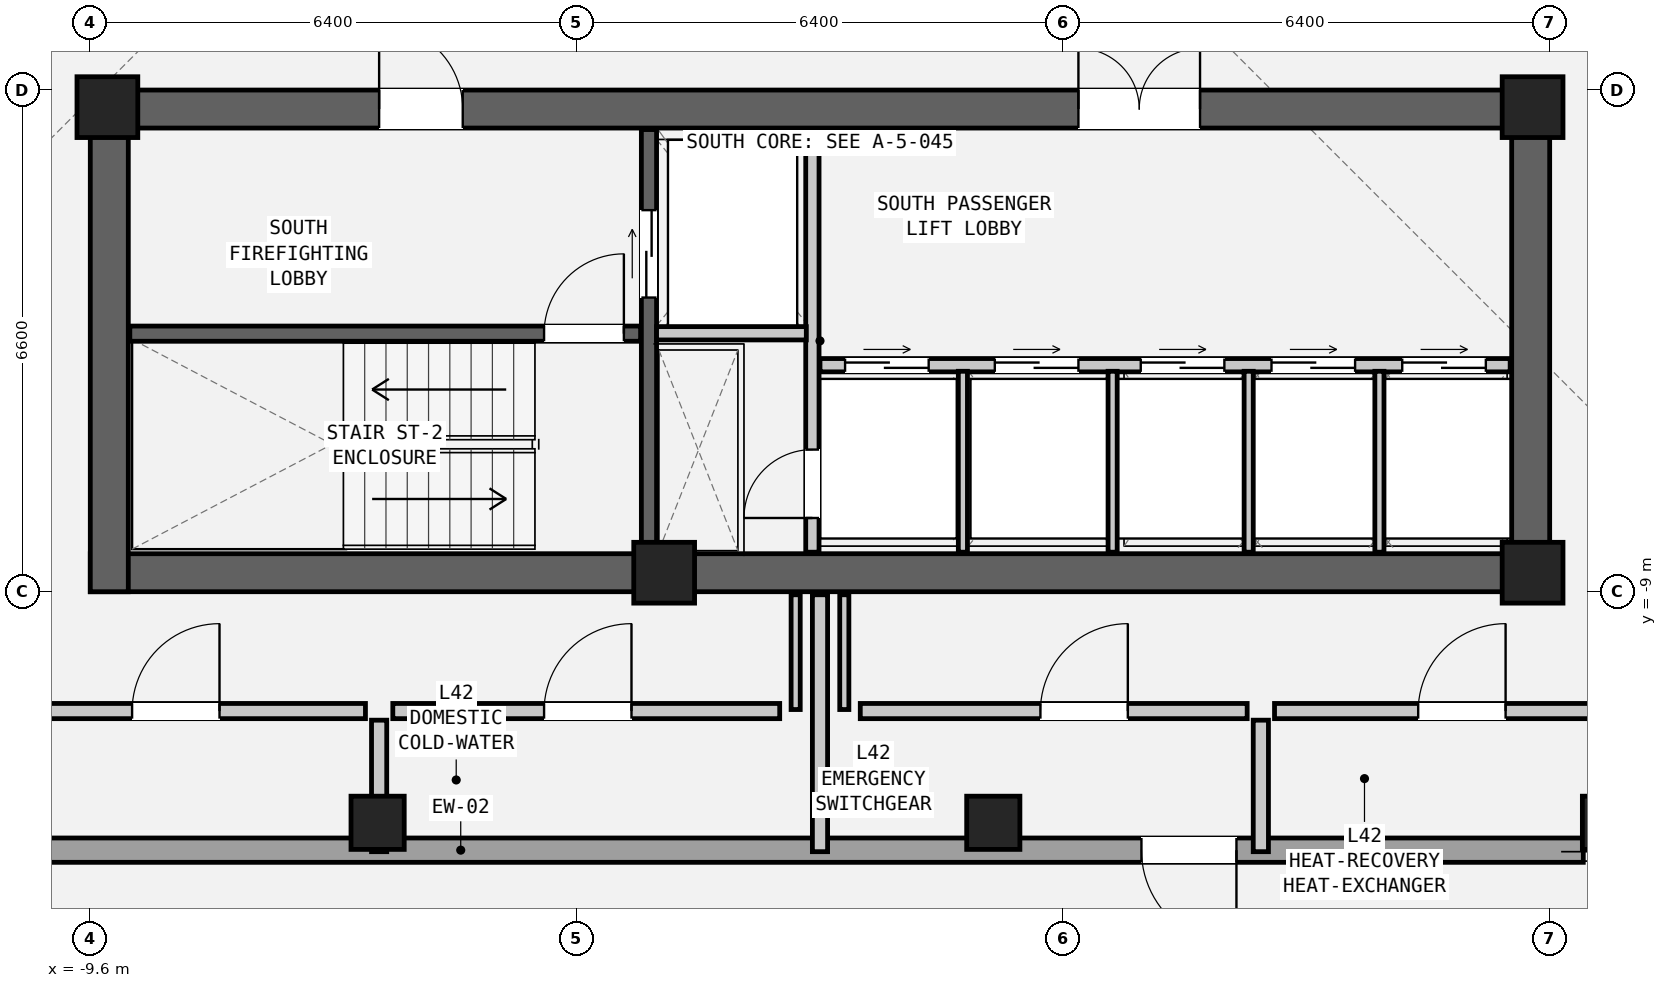
"""IFC4 building model, lengths in metres.
Left out: names, types, materials, properties, quantities, classifications, styles, units other than length and angle.
Written with IfcOpenShell. Run it as: python <this file> out.ifc"""

import sys

from ifc_helpers import new_model, si_unit, direction, frame, frame_2d, origin, origin_2d, place, context, subcontext, project, spatial, rectangle, hollow_rectangle, extrude, element, fill, save


model = new_model("IFC4")
c1 = context("Model", 3, precision=1e-05, world=origin(), true_north=direction((0.0, 1.0)))
c2 = subcontext(c1, "Body", "Model", "MODEL_VIEW")
j1 = project(units=[si_unit("LENGTHUNIT", "METRE"), si_unit("PLANEANGLEUNIT", "RADIAN")], contexts=[c1])
p1 = place(None, origin())
s1 = spatial("IfcSite", under=j1, at=p1, CompositionType="ELEMENT")
p2 = place(p1, origin())
s2 = spatial("IfcBuilding", under=s1, at=p2, CompositionType="ELEMENT")
p3 = place(p2, frame((0.0, 0.0, 144.6)))
s3 = spatial("IfcBuildingStorey", under=s2, at=p3, CompositionType="ELEMENT", Elevation=144.6)
p4 = place(p3, frame((-9.6, -8.75, 0.0), z_axis=(0.0, 0.0, 1.0), x_axis=(1.0, 0.0, 0.0)))
e1 = element("IfcWall", 1, at=p4, inside=s3, PredefinedType="SHEAR", context=c2, shape_type="SweptSolid", body=[
    extrude(rectangle(XDim=19.2, YDim=0.5, at=frame_2d((9.6, 0.0))), origin(), (0.0, 0.0, 1.0), 3.6),
])
p5 = place(p3, frame((-9.6, -2.65, 0.0), z_axis=(0.0, 0.0, 1.0), x_axis=(1.0, 0.0, 0.0)))
e2 = element("IfcWall", 2, at=p5, inside=s3, PredefinedType="SHEAR", context=c2, shape_type="SweptSolid", body=[
    extrude(rectangle(XDim=19.2, YDim=0.5, at=frame_2d((9.6, 0.0))), origin(), (0.0, 0.0, 1.0), 3.6),
])
p6 = place(p5, frame((3.8, 0.0, 0.0)))
e3 = element("IfcOpeningElement", 3, at=p6, cuts=e2, PredefinedType="OPENING", context=c2, shape_type="SweptSolid", body=[
    extrude(rectangle(XDim=1.1, YDim=2.08, at=frame_2d((0.55, 1.04))), frame((0.0, 0.262, 0.0), z_axis=(0.0, -1.0, 0.0), x_axis=(1.0, 0.0, 0.0)), (0.0, 0.0, 1.0), 0.524),
])
p7 = place(p5, frame((13.0, 0.0, 0.0)))
e4 = element("IfcOpeningElement", 4, at=p7, cuts=e2, PredefinedType="OPENING", context=c2, shape_type="SweptSolid", body=[
    extrude(rectangle(XDim=1.6, YDim=2.12, at=frame_2d((0.8, 1.06))), frame((0.0, 0.262, 0.0), z_axis=(0.0, -1.0, 0.0), x_axis=(1.0, 0.0, 0.0)), (0.0, 0.0, 1.0), 0.524),
])
for number, where, z_axis, x_axis in (
    (5, (-9.35, -9.0, 0.0), (0.0, 0.0, 1.0), (0.0, 1.0, 0.0)),
    (6, (9.35, -9.0, 0.0), (0.0, 0.0, 1.0), (0.0, 1.0, 0.0)),
):
    element("IfcWall", number, at=place(p3, frame(where, z_axis=z_axis, x_axis=x_axis)), inside=s3, PredefinedType="SHEAR", context=c2, shape_type="SweptSolid", body=[
        extrude(rectangle(XDim=6.6, YDim=0.5, at=frame_2d((3.3, 0.0))), origin(), (0.0, 0.0, 1.0), 3.6),
    ])
for number, where, z_axis, x_axis in (
    (7, (-5.82, -12.04, 0.0), (0.0, 0.0, 1.0), (1.0, 0.0, 0.0)),
    (8, (2.28, -12.04, 0.0), (0.0, 0.0, 1.0), (1.0, 0.0, 0.0)),
    (9, (10.38, -12.04, 0.0), (0.0, 0.0, 1.0), (1.0, 0.0, 0.0)),
):
    element("IfcColumn", number, at=place(p3, frame(where, z_axis=z_axis, x_axis=x_axis)), inside=s3, PredefinedType="COLUMN", context=c2, shape_type="SweptSolid", body=[
        extrude(hollow_rectangle(XDim=0.7, YDim=0.7, WallThickness=0.045, at=origin_2d()), origin(), (0.0, 0.0, 1.0), 3.6),
    ])
for number, where, z_axis, x_axis in (
    (10, (-9.375, -2.625, 0.0), (0.0, 0.0, 1.0), (1.0, 0.0, 0.0)),
    (11, (9.375, -2.625, 0.0), (0.0, 0.0, 1.0), (1.0, 0.0, 0.0)),
    (12, (-2.05, -8.75, 0.0), (0.0, 0.0, 1.0), (1.0, 0.0, 0.0)),
    (13, (9.375, -8.75, 0.0), (0.0, 0.0, 1.0), (1.0, 0.0, 0.0)),
):
    element("IfcColumn", number, at=place(p3, frame(where, z_axis=z_axis, x_axis=x_axis)), inside=s3, PredefinedType="COLUMN", context=c2, shape_type="SweptSolid", body=[
        extrude(rectangle(XDim=0.8, YDim=0.8, at=origin_2d()), origin(), (0.0, 0.0, 1.0), 3.6),
    ])
p8 = place(p3, frame((10.042, -12.4, 0.0), z_axis=(0.0, 0.0, 1.0), x_axis=(-1.0, 0.0, 0.0)))
e14 = element("IfcWall", 14, at=p8, inside=s3, PredefinedType="SOLIDWALL", context=c2, shape_type="SweptSolid", body=[
    extrude(rectangle(XDim=23.624, YDim=0.32, at=frame_2d((11.812, 0.0))), origin(), (0.0, 0.0, 1.0), 2.242),
])
p9 = place(p8, frame((4.563, 0.0, 0.0)))
e15 = element("IfcOpeningElement", 15, at=p9, cuts=e14, PredefinedType="OPENING", context=c2, shape_type="SweptSolid", body=[
    extrude(rectangle(XDim=1.25, YDim=2.02, at=frame_2d((0.625, 1.01))), frame((0.0, 0.172, 0.0), z_axis=(0.0, -1.0, 0.0), x_axis=(1.0, 0.0, 0.0)), (0.0, 0.0, 1.0), 0.344),
])
p10 = place(p3, frame((-9.08, -5.605, 0.0), z_axis=(0.0, 0.0, 1.0), x_axis=(1.0, 0.0, 0.0)))
e16 = element("IfcWall", 16, at=p10, inside=s3, PredefinedType="SHEAR", context=c2, shape_type="SweptSolid", body=[
    extrude(rectangle(XDim=6.72, YDim=0.2, at=frame_2d((3.36, 0.0))), origin(), (0.0, 0.0, 1.0), 3.38),
])
p11 = place(p10, frame((5.45, 0.0, 0.0)))
e17 = element("IfcOpeningElement", 17, at=p11, cuts=e16, PredefinedType="OPENING", context=c2, shape_type="SweptSolid", body=[
    extrude(rectangle(XDim=1.05, YDim=2.08, at=frame_2d((0.525, 1.04))), frame((0.0, 0.112, 0.0), z_axis=(0.0, -1.0, 0.0), x_axis=(1.0, 0.0, 0.0)), (0.0, 0.0, 1.0), 0.224),
])
p12 = place(p3, frame((-2.25, -8.48, 0.0), z_axis=(0.0, 0.0, 1.0), x_axis=(0.0, 1.0, 0.0)))
e18 = element("IfcWall", 18, at=p12, inside=s3, PredefinedType="SHEAR", context=c2, shape_type="SweptSolid", body=[
    extrude(rectangle(XDim=5.56, YDim=0.2, at=frame_2d((2.78, 0.0))), origin(), (0.0, 0.0, 1.0), 3.38),
])
p13 = place(p12, frame((3.35, 0.0, 0.0)))
e19 = element("IfcOpeningElement", 19, at=p13, cuts=e18, PredefinedType="OPENING", context=c2, shape_type="SweptSolid", body=[
    extrude(rectangle(XDim=1.15, YDim=2.08, at=frame_2d((0.575, 1.04))), frame((0.0, 0.112, 0.0), z_axis=(0.0, -1.0, 0.0), x_axis=(1.0, 0.0, 0.0)), (0.0, 0.0, 1.0), 0.224),
])
p14 = place(p3, frame((-0.1, -8.48, 0.0), z_axis=(0.0, 0.0, 1.0), x_axis=(0.0, 1.0, 0.0)))
e20 = element("IfcWall", 20, at=p14, inside=s3, PredefinedType="PARTITIONING", context=c2, shape_type="SweptSolid", body=[
    extrude(rectangle(XDim=5.56, YDim=0.175, at=frame_2d((2.78, 0.0))), origin(), (0.0, 0.0, 1.0), 3.38),
])
p15 = place(p14, frame((0.45, 0.0, 0.0)))
e21 = element("IfcOpeningElement", 21, at=p15, cuts=e20, PredefinedType="OPENING", context=c2, shape_type="SweptSolid", body=[
    extrude(rectangle(XDim=0.9, YDim=2.05, at=frame_2d((0.45, 1.025))), frame((0.0, 0.1, 0.0), z_axis=(0.0, -1.0, 0.0), x_axis=(1.0, 0.0, 0.0)), (0.0, 0.0, 1.0), 0.199),
])
p16 = place(p3, frame((-2.15, -5.6, 0.0), z_axis=(0.0, 0.0, 1.0), x_axis=(1.0, 0.0, 0.0)))
e22 = element("IfcWall", 22, at=p16, inside=s3, PredefinedType="PARTITIONING", context=c2, shape_type="SweptSolid", body=[
    extrude(rectangle(XDim=1.97, YDim=0.175, at=frame_2d((0.985, 0.0))), origin(), (0.0, 0.0, 1.0), 3.38),
])
p17 = place(p3, frame((0.0, -6.02, 0.0), z_axis=(0.0, 0.0, 1.0), x_axis=(1.0, 0.0, 0.0)))
e23 = element("IfcWall", 23, at=p17, inside=s3, PredefinedType="PARTITIONING", context=c2, shape_type="SweptSolid", body=[
    extrude(rectangle(XDim=9.08, YDim=0.175, at=frame_2d((4.54, 0.0))), origin(), (0.0, 0.0, 1.0), 3.38),
])
p18 = place(p17, frame((0.33, 0.0, 0.0)))
e24 = element("IfcOpeningElement", 24, at=p18, cuts=e23, PredefinedType="OPENING", context=c2, shape_type="SweptSolid", body=[
    extrude(rectangle(XDim=1.1, YDim=2.06, at=frame_2d((0.55, 1.03))), frame((0.0, 0.1, 0.0), z_axis=(0.0, -1.0, 0.0), x_axis=(1.0, 0.0, 0.0)), (0.0, 0.0, 1.0), 0.199),
])
p19 = place(p17, frame((2.3, 0.0, 0.0)))
e25 = element("IfcOpeningElement", 25, at=p19, cuts=e23, PredefinedType="OPENING", context=c2, shape_type="SweptSolid", body=[
    extrude(rectangle(XDim=1.1, YDim=2.06, at=frame_2d((0.55, 1.03))), frame((0.0, 0.1, 0.0), z_axis=(0.0, -1.0, 0.0), x_axis=(1.0, 0.0, 0.0)), (0.0, 0.0, 1.0), 0.199),
])
p20 = place(p17, frame((4.22, 0.0, 0.0)))
e26 = element("IfcOpeningElement", 26, at=p20, cuts=e23, PredefinedType="OPENING", context=c2, shape_type="SweptSolid", body=[
    extrude(rectangle(XDim=1.1, YDim=2.06, at=frame_2d((0.55, 1.03))), frame((0.0, 0.1, 0.0), z_axis=(0.0, -1.0, 0.0), x_axis=(1.0, 0.0, 0.0)), (0.0, 0.0, 1.0), 0.199),
])
p21 = place(p17, frame((5.94, 0.0, 0.0)))
e27 = element("IfcOpeningElement", 27, at=p21, cuts=e23, PredefinedType="OPENING", context=c2, shape_type="SweptSolid", body=[
    extrude(rectangle(XDim=1.1, YDim=2.06, at=frame_2d((0.55, 1.03))), frame((0.0, 0.1, 0.0), z_axis=(0.0, -1.0, 0.0), x_axis=(1.0, 0.0, 0.0)), (0.0, 0.0, 1.0), 0.199),
])
p22 = place(p17, frame((7.66, 0.0, 0.0)))
e28 = element("IfcOpeningElement", 28, at=p22, cuts=e23, PredefinedType="OPENING", context=c2, shape_type="SweptSolid", body=[
    extrude(rectangle(XDim=1.1, YDim=2.06, at=frame_2d((0.55, 1.03))), frame((0.0, 0.1, 0.0), z_axis=(0.0, -1.0, 0.0), x_axis=(1.0, 0.0, 0.0)), (0.0, 0.0, 1.0), 0.199),
])
for number, where, z_axis, x_axis in (
    (29, (1.88, -8.48, 0.0), (0.0, 0.0, 1.0), (0.0, 1.0, 0.0)),
    (30, (3.85, -8.48, 0.0), (0.0, 0.0, 1.0), (0.0, 1.0, 0.0)),
    (31, (5.64, -8.48, 0.0), (0.0, 0.0, 1.0), (0.0, 1.0, 0.0)),
    (32, (7.36, -8.48, 0.0), (0.0, 0.0, 1.0), (0.0, 1.0, 0.0)),
):
    element("IfcWall", number, at=place(p3, frame(where, z_axis=z_axis, x_axis=x_axis)), inside=s3, PredefinedType="PARTITIONING", context=c2, shape_type="SweptSolid", body=[
        extrude(rectangle(XDim=2.38, YDim=0.12, at=frame_2d((1.19, 0.0))), origin(), (0.0, 0.0, 1.0), 3.38),
    ])
p23 = place(p3, frame((0.0, -12.42, 0.0), z_axis=(0.0, 0.0, 1.0), x_axis=(0.0, 1.0, 0.0)))
e33 = element("IfcWall", 33, at=p23, inside=s3, PredefinedType="PARTITIONING", context=c2, shape_type="SweptSolid", body=[
    extrude(rectangle(XDim=3.38, YDim=0.2, at=frame_2d((1.69, 0.0))), origin(), (0.0, 0.0, 1.0), 2.901),
])
for number, where, z_axis, x_axis in (
    (34, (-0.32, -10.55, 0.0), (0.0, 0.0, 1.0), (0.0, 1.0, 0.0)),
    (35, (0.32, -10.55, 0.0), (0.0, 0.0, 1.0), (0.0, 1.0, 0.0)),
):
    element("IfcWall", number, at=place(p3, frame(where, z_axis=z_axis, x_axis=x_axis)), inside=s3, PredefinedType="PARTITIONING", context=c2, shape_type="SweptSolid", body=[
        extrude(rectangle(XDim=1.51, YDim=0.12, at=frame_2d((0.755, 0.0))), origin(), (0.0, 0.0, 1.0), 2.901),
    ])
p24 = place(p3, frame((-10.97, -10.57, 0.0), z_axis=(0.0, 0.0, 1.0), x_axis=(1.0, 0.0, 0.0)))
e36 = element("IfcWall", 36, at=p24, inside=s3, PredefinedType="PARTITIONING", context=c2, shape_type="SweptSolid", body=[
    extrude(rectangle(XDim=4.99, YDim=0.2, at=frame_2d((2.495, 0.0))), origin(), (0.0, 0.0, 1.0), 3.38),
])
p25 = place(p24, frame((1.92, 0.0, 0.0)))
e37 = element("IfcOpeningElement", 37, at=p25, cuts=e36, PredefinedType="OPENING", context=c2, shape_type="SweptSolid", body=[
    extrude(rectangle(XDim=1.15, YDim=2.1, at=frame_2d((0.575, 1.05))), frame((0.0, 0.112, 0.0), z_axis=(0.0, -1.0, 0.0), x_axis=(1.0, 0.0, 0.0)), (0.0, 0.0, 1.0), 0.224),
])
p26 = place(p3, frame((-5.8, -12.42, 0.0), z_axis=(0.0, 0.0, 1.0), x_axis=(0.0, 1.0, 0.0)))
e38 = element("IfcWall", 38, at=p26, inside=s3, PredefinedType="PARTITIONING", context=c2, shape_type="SweptSolid", body=[
    extrude(rectangle(XDim=1.73, YDim=0.2, at=frame_2d((0.865, 0.0))), origin(), (0.0, 0.0, 1.0), 2.901),
])
p27 = place(p3, frame((-5.62, -10.57, 0.0), z_axis=(0.0, 0.0, 1.0), x_axis=(1.0, 0.0, 0.0)))
e39 = element("IfcWall", 39, at=p27, inside=s3, PredefinedType="PARTITIONING", context=c2, shape_type="SweptSolid", body=[
    extrude(rectangle(XDim=5.09, YDim=0.2, at=frame_2d((2.545, 0.0))), origin(), (0.0, 0.0, 1.0), 3.38),
])
p28 = place(p27, frame((1.99, 0.0, 0.0)))
e40 = element("IfcOpeningElement", 40, at=p28, cuts=e39, PredefinedType="OPENING", context=c2, shape_type="SweptSolid", body=[
    extrude(rectangle(XDim=1.15, YDim=2.1, at=frame_2d((0.575, 1.05))), frame((0.0, 0.112, 0.0), z_axis=(0.0, -1.0, 0.0), x_axis=(1.0, 0.0, 0.0)), (0.0, 0.0, 1.0), 0.224),
])
p29 = place(p3, frame((0.53, -10.57, 0.0), z_axis=(0.0, 0.0, 1.0), x_axis=(1.0, 0.0, 0.0)))
e41 = element("IfcWall", 41, at=p29, inside=s3, PredefinedType="PARTITIONING", context=c2, shape_type="SweptSolid", body=[
    extrude(rectangle(XDim=5.09, YDim=0.2, at=frame_2d((2.545, 0.0))), origin(), (0.0, 0.0, 1.0), 3.38),
])
p30 = place(p29, frame((2.37, 0.0, 0.0)))
e42 = element("IfcOpeningElement", 42, at=p30, cuts=e41, PredefinedType="OPENING", context=c2, shape_type="SweptSolid", body=[
    extrude(rectangle(XDim=1.15, YDim=2.1, at=frame_2d((0.575, 1.05))), frame((0.0, 0.112, 0.0), z_axis=(0.0, -1.0, 0.0), x_axis=(1.0, 0.0, 0.0)), (0.0, 0.0, 1.0), 0.224),
])
p31 = place(p3, frame((5.8, -12.42, 0.0), z_axis=(0.0, 0.0, 1.0), x_axis=(0.0, 1.0, 0.0)))
e43 = element("IfcWall", 43, at=p31, inside=s3, PredefinedType="PARTITIONING", context=c2, shape_type="SweptSolid", body=[
    extrude(rectangle(XDim=1.73, YDim=0.2, at=frame_2d((0.865, 0.0))), origin(), (0.0, 0.0, 1.0), 2.901),
])
p32 = place(p3, frame((5.98, -10.57, 0.0), z_axis=(0.0, 0.0, 1.0), x_axis=(1.0, 0.0, 0.0)))
e44 = element("IfcWall", 44, at=p32, inside=s3, PredefinedType="PARTITIONING", context=c2, shape_type="SweptSolid", body=[
    extrude(rectangle(XDim=4.99, YDim=0.2, at=frame_2d((2.495, 0.0))), origin(), (0.0, 0.0, 1.0), 3.38),
])
p33 = place(p32, frame((1.89, 0.0, 0.0)))
e45 = element("IfcOpeningElement", 45, at=p33, cuts=e44, PredefinedType="OPENING", context=c2, shape_type="SweptSolid", body=[
    extrude(rectangle(XDim=1.15, YDim=2.1, at=frame_2d((0.575, 1.05))), frame((0.0, 0.112, 0.0), z_axis=(0.0, -1.0, 0.0), x_axis=(1.0, 0.0, 0.0)), (0.0, 0.0, 1.0), 0.224),
])
p34 = place(p9, origin())
e46 = element("IfcDoor", 46, at=p34, inside=s3, OperationType="SINGLE_SWING_LEFT", PredefinedType="DOOR", context=c2, shape_type="SweptSolid", body=[
    extrude(rectangle(XDim=1.25, YDim=2.02, at=frame_2d((0.625, 1.01))), frame((0.0, 0.025, 0.0), z_axis=(0.0, -1.0, 0.0), x_axis=(1.0, 0.0, 0.0)), (0.0, 0.0, 1.0), 0.05),
])
fill(e15, e46)
p35 = place(p11, origin())
e47 = element("IfcDoor", 47, at=p35, inside=s3, OperationType="SINGLE_SWING_RIGHT", PredefinedType="DOOR", context=c2, shape_type="SweptSolid", body=[
    extrude(rectangle(XDim=1.05, YDim=2.08, at=frame_2d((0.525, 1.04))), frame((0.0, 0.025, 0.0), z_axis=(0.0, -1.0, 0.0), x_axis=(1.0, 0.0, 0.0)), (0.0, 0.0, 1.0), 0.05),
])
fill(e17, e47)
p36 = place(p6, origin())
e48 = element("IfcDoor", 48, at=p36, inside=s3, OperationType="SINGLE_SWING_LEFT", PredefinedType="DOOR", context=c2, shape_type="SweptSolid", body=[
    extrude(rectangle(XDim=1.1, YDim=2.08, at=frame_2d((0.55, 1.04))), frame((0.0, 0.025, 0.0), z_axis=(0.0, -1.0, 0.0), x_axis=(1.0, 0.0, 0.0)), (0.0, 0.0, 1.0), 0.05),
])
fill(e3, e48)
p37 = place(p13, origin())
e49 = element("IfcDoor", 49, at=p37, inside=s3, OperationType="DOUBLE_DOOR_SLIDING", PredefinedType="DOOR", context=c2, shape_type="SweptSolid", body=[
    extrude(rectangle(XDim=1.15, YDim=2.08, at=frame_2d((0.575, 1.04))), frame((0.0, 0.025, 0.0), z_axis=(0.0, -1.0, 0.0), x_axis=(1.0, 0.0, 0.0)), (0.0, 0.0, 1.0), 0.05),
])
fill(e19, e49)
p38 = place(p15, origin())
e50 = element("IfcDoor", 50, at=p38, inside=s3, OperationType="SINGLE_SWING_LEFT", PredefinedType="DOOR", context=c2, shape_type="SweptSolid", body=[
    extrude(rectangle(XDim=0.9, YDim=2.05, at=frame_2d((0.45, 1.025))), frame((0.0, 0.025, 0.0), z_axis=(0.0, -1.0, 0.0), x_axis=(1.0, 0.0, 0.0)), (0.0, 0.0, 1.0), 0.05),
])
fill(e21, e50)
p39 = place(p18, origin())
e51 = element("IfcDoor", 51, at=p39, inside=s3, OperationType="DOUBLE_DOOR_SLIDING", PredefinedType="DOOR", context=c2, shape_type="SweptSolid", body=[
    extrude(rectangle(XDim=1.1, YDim=2.06, at=frame_2d((0.55, 1.03))), frame((0.0, 0.025, 0.0), z_axis=(0.0, -1.0, 0.0), x_axis=(1.0, 0.0, 0.0)), (0.0, 0.0, 1.0), 0.05),
])
fill(e24, e51)
p40 = place(p19, origin())
e52 = element("IfcDoor", 52, at=p40, inside=s3, OperationType="DOUBLE_DOOR_SLIDING", PredefinedType="DOOR", context=c2, shape_type="SweptSolid", body=[
    extrude(rectangle(XDim=1.1, YDim=2.06, at=frame_2d((0.55, 1.03))), frame((0.0, 0.025, 0.0), z_axis=(0.0, -1.0, 0.0), x_axis=(1.0, 0.0, 0.0)), (0.0, 0.0, 1.0), 0.05),
])
fill(e25, e52)
p41 = place(p7, origin())
e53 = element("IfcDoor", 53, at=p41, inside=s3, OperationType="DOUBLE_DOOR_SINGLE_SWING", PredefinedType="DOOR", context=c2, shape_type="SweptSolid", body=[
    extrude(rectangle(XDim=1.6, YDim=2.12, at=frame_2d((0.8, 1.06))), frame((0.0, 0.025, 0.0), z_axis=(0.0, -1.0, 0.0), x_axis=(1.0, 0.0, 0.0)), (0.0, 0.0, 1.0), 0.05),
])
fill(e4, e53)
p42 = place(p25, origin())
e54 = element("IfcDoor", 54, at=p42, inside=s3, OperationType="SINGLE_SWING_RIGHT", PredefinedType="DOOR", context=c2, shape_type="SweptSolid", body=[
    extrude(rectangle(XDim=1.15, YDim=2.1, at=frame_2d((0.575, 1.05))), frame((0.0, 0.025, 0.0), z_axis=(0.0, -1.0, 0.0), x_axis=(1.0, 0.0, 0.0)), (0.0, 0.0, 1.0), 0.05),
])
fill(e37, e54)
p43 = place(p28, origin())
e55 = element("IfcDoor", 55, at=p43, inside=s3, OperationType="SINGLE_SWING_RIGHT", PredefinedType="DOOR", context=c2, shape_type="SweptSolid", body=[
    extrude(rectangle(XDim=1.15, YDim=2.1, at=frame_2d((0.575, 1.05))), frame((0.0, 0.025, 0.0), z_axis=(0.0, -1.0, 0.0), x_axis=(1.0, 0.0, 0.0)), (0.0, 0.0, 1.0), 0.05),
])
fill(e40, e55)
p44 = place(p30, origin())
e56 = element("IfcDoor", 56, at=p44, inside=s3, OperationType="SINGLE_SWING_RIGHT", PredefinedType="DOOR", context=c2, shape_type="SweptSolid", body=[
    extrude(rectangle(XDim=1.15, YDim=2.1, at=frame_2d((0.575, 1.05))), frame((0.0, 0.025, 0.0), z_axis=(0.0, -1.0, 0.0), x_axis=(1.0, 0.0, 0.0)), (0.0, 0.0, 1.0), 0.05),
])
fill(e42, e56)
p45 = place(p33, origin())
e57 = element("IfcDoor", 57, at=p45, inside=s3, OperationType="SINGLE_SWING_RIGHT", PredefinedType="DOOR", context=c2, shape_type="SweptSolid", body=[
    extrude(rectangle(XDim=1.15, YDim=2.1, at=frame_2d((0.575, 1.05))), frame((0.0, 0.025, 0.0), z_axis=(0.0, -1.0, 0.0), x_axis=(1.0, 0.0, 0.0)), (0.0, 0.0, 1.0), 0.05),
])
fill(e45, e57)
p46 = place(p20, origin())
e58 = element("IfcDoor", 58, at=p46, inside=s3, OperationType="DOUBLE_DOOR_SLIDING", PredefinedType="DOOR", context=c2, shape_type="SweptSolid", body=[
    extrude(rectangle(XDim=1.1, YDim=2.06, at=frame_2d((0.55, 1.03))), frame((0.0, 0.025, 0.0), z_axis=(0.0, -1.0, 0.0), x_axis=(1.0, 0.0, 0.0)), (0.0, 0.0, 1.0), 0.05),
])
fill(e26, e58)
p47 = place(p21, origin())
e59 = element("IfcDoor", 59, at=p47, inside=s3, OperationType="DOUBLE_DOOR_SLIDING", PredefinedType="DOOR", context=c2, shape_type="SweptSolid", body=[
    extrude(rectangle(XDim=1.1, YDim=2.06, at=frame_2d((0.55, 1.03))), frame((0.0, 0.025, 0.0), z_axis=(0.0, -1.0, 0.0), x_axis=(1.0, 0.0, 0.0)), (0.0, 0.0, 1.0), 0.05),
])
fill(e27, e59)
p48 = place(p22, origin())
e60 = element("IfcDoor", 60, at=p48, inside=s3, OperationType="DOUBLE_DOOR_SLIDING", PredefinedType="DOOR", context=c2, shape_type="SweptSolid", body=[
    extrude(rectangle(XDim=1.1, YDim=2.06, at=frame_2d((0.55, 1.03))), frame((0.0, 0.025, 0.0), z_axis=(0.0, -1.0, 0.0), x_axis=(1.0, 0.0, 0.0)), (0.0, 0.0, 1.0), 0.05),
])
fill(e28, e60)
save(model, sys.argv[1])
